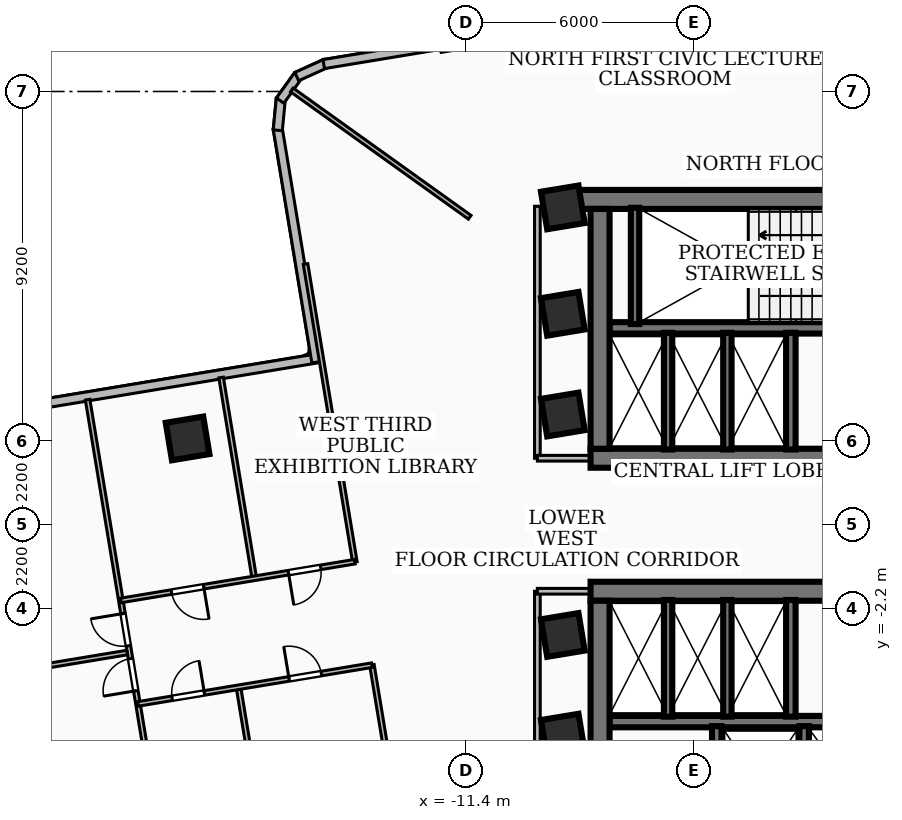
"""IFC4 building model, lengths in metres.
Left out: names, types, materials, properties, quantities, classifications, styles, units other than length and angle.
Written with IfcOpenShell. Run it as: python <this file> out.ifc"""

import sys

from ifc_helpers import new_model, si_unit, direction, frame, frame_2d, origin, origin_2d, place, context, subcontext, project, spatial, rectangle, extrude, element, fill, save


model = new_model("IFC4")
c1 = context("Model", 3, precision=1e-05, world=origin(), true_north=direction((0.0, 1.0)))
c2 = subcontext(c1, "Body", "Model", "MODEL_VIEW")
j1 = project(units=[si_unit("LENGTHUNIT", "METRE"), si_unit("PLANEANGLEUNIT", "RADIAN")], contexts=[c1])
p1 = place(None, origin())
s1 = spatial("IfcSite", under=j1, at=p1, CompositionType="ELEMENT")
p2 = place(p1, origin())
s2 = spatial("IfcBuilding", under=s1, at=p2, CompositionType="ELEMENT")
p3 = place(p2, frame((0.0, 0.0, 92.88)))
s3 = spatial("IfcBuildingStorey", under=s2, at=p3, CompositionType="ELEMENT", Elevation=92.88)
p4 = place(p3, frame((-8.78, 8.56, 0.0), z_axis=(0.0, 0.0, 1.0), x_axis=(1.0, 0.0, 0.0)))
e1 = element("IfcWall", 1, at=p4, inside=s3, PredefinedType="SHEAR", context=c2, shape_type="SweptSolid", body=[
    extrude(rectangle(XDim=17.56, YDim=0.5, at=frame_2d((8.78, 0.0))), origin(), (0.0, 0.0, 1.0), 3.34),
])
p5 = place(p3, frame((8.12, 1.75, 0.0), z_axis=(0.0, 0.0, 1.0), x_axis=(-1.0, 0.0, 0.0)))
e2 = element("IfcWall", 2, at=p5, inside=s3, PredefinedType="SHEAR", context=c2, shape_type="SweptSolid", body=[
    extrude(rectangle(XDim=16.24, YDim=0.5, at=frame_2d((8.12, 0.0))), origin(), (0.0, 0.0, 1.0), 3.34),
])
p6 = place(p5, frame((7.45, 0.0, 0.0)))
e3 = element("IfcOpeningElement", 3, at=p6, cuts=e2, PredefinedType="OPENING", context=c2, shape_type="SweptSolid", body=[
    extrude(rectangle(XDim=1.0, YDim=2.1, at=frame_2d((0.5, 1.05))), frame((0.0, 0.26, 0.0), z_axis=(0.0, -1.0, 0.0), x_axis=(1.0, 0.0, 0.0)), (0.0, 0.0, 1.0), 0.52),
])
p7 = place(p5, frame((3.85, 0.0, 0.0)))
e4 = element("IfcOpeningElement", 4, at=p7, cuts=e2, PredefinedType="OPENING", context=c2, shape_type="SweptSolid", body=[
    extrude(rectangle(XDim=0.9, YDim=2.06, at=frame_2d((0.45, 1.03))), frame((0.0, 0.26, 0.0), z_axis=(0.0, -1.0, 0.0), x_axis=(1.0, 0.0, 0.0)), (0.0, 0.0, 1.0), 0.52),
])
p8 = place(p5, frame((2.35, 0.0, 0.0)))
e5 = element("IfcOpeningElement", 5, at=p8, cuts=e2, PredefinedType="OPENING", context=c2, shape_type="SweptSolid", body=[
    extrude(rectangle(XDim=0.9, YDim=2.06, at=frame_2d((0.45, 1.03))), frame((0.0, 0.26, 0.0), z_axis=(0.0, -1.0, 0.0), x_axis=(1.0, 0.0, 0.0)), (0.0, 0.0, 1.0), 0.52),
])
p9 = place(p5, frame((0.8, 0.0, 0.0)))
e6 = element("IfcOpeningElement", 6, at=p9, cuts=e2, PredefinedType="OPENING", context=c2, shape_type="SweptSolid", body=[
    extrude(rectangle(XDim=0.9, YDim=2.06, at=frame_2d((0.45, 1.03))), frame((0.0, 0.26, 0.0), z_axis=(0.0, -1.0, 0.0), x_axis=(1.0, 0.0, 0.0)), (0.0, 0.0, 1.0), 0.52),
])
p10 = place(p3, frame((-7.87, 2.0, 0.0), z_axis=(0.0, 0.0, 1.0), x_axis=(0.0, 1.0, 0.0)))
e7 = element("IfcWall", 7, at=p10, inside=s3, PredefinedType="SHEAR", context=c2, shape_type="SweptSolid", body=[
    extrude(rectangle(XDim=6.31, YDim=0.5, at=frame_2d((3.155, 0.0))), origin(), (0.0, 0.0, 1.0), 3.34),
])
p11 = place(p3, frame((7.62, 5.18, 0.0), z_axis=(0.0, 0.0, 1.0), x_axis=(-1.0, 0.0, 0.0)))
e8 = element("IfcWall", 8, at=p11, inside=s3, PredefinedType="SOLIDWALL", context=c2, shape_type="SweptSolid", body=[
    extrude(rectangle(XDim=15.24, YDim=0.3, at=frame_2d((7.62, 0.0))), origin(), (0.0, 0.0, 1.0), 3.34),
])
p12 = place(p11, frame((5.77, 0.0, 0.0)))
e9 = element("IfcOpeningElement", 9, at=p12, cuts=e8, PredefinedType="OPENING", context=c2, shape_type="SweptSolid", body=[
    extrude(rectangle(XDim=1.1, YDim=2.15, at=frame_2d((0.55, 1.075))), frame((0.0, 0.16, 0.0), z_axis=(0.0, -1.0, 0.0), x_axis=(1.0, 0.0, 0.0)), (0.0, 0.0, 1.0), 0.32),
])
p13 = place(p11, frame((2.97, 0.0, 0.0)))
e10 = element("IfcOpeningElement", 10, at=p13, cuts=e8, PredefinedType="OPENING", context=c2, shape_type="SweptSolid", body=[
    extrude(rectangle(XDim=1.1, YDim=2.15, at=frame_2d((0.55, 1.075))), frame((0.0, 0.16, 0.0), z_axis=(0.0, -1.0, 0.0), x_axis=(1.0, 0.0, 0.0)), (0.0, 0.0, 1.0), 0.32),
])
p14 = place(p11, frame((7.97, 0.0, 0.0)))
e11 = element("IfcOpeningElement", 11, at=p14, cuts=e8, PredefinedType="OPENING", context=c2, shape_type="SweptSolid", body=[
    extrude(rectangle(XDim=1.0, YDim=2.1, at=frame_2d((0.5, 1.05))), frame((0.0, 0.16, 0.0), z_axis=(0.0, -1.0, 0.0), x_axis=(1.0, 0.0, 0.0)), (0.0, 0.0, 1.0), 0.32),
])
p15 = place(p3, frame((-8.12, -1.75, 0.0), z_axis=(0.0, 0.0, 1.0), x_axis=(1.0, 0.0, 0.0)))
e12 = element("IfcWall", 12, at=p15, inside=s3, PredefinedType="SHEAR", context=c2, shape_type="SweptSolid", body=[
    extrude(rectangle(XDim=16.24, YDim=0.5, at=frame_2d((8.12, 0.0))), origin(), (0.0, 0.0, 1.0), 3.34),
])
p16 = place(p15, frame((7.45, 0.0, 0.0)))
e13 = element("IfcOpeningElement", 13, at=p16, cuts=e12, PredefinedType="OPENING", context=c2, shape_type="SweptSolid", body=[
    extrude(rectangle(XDim=1.0, YDim=2.1, at=frame_2d((0.5, 1.05))), frame((0.0, 0.26, 0.0), z_axis=(0.0, -1.0, 0.0), x_axis=(1.0, 0.0, 0.0)), (0.0, 0.0, 1.0), 0.52),
])
p17 = place(p15, frame((10.965, 0.0, 0.0)))
e14 = element("IfcOpeningElement", 14, at=p17, cuts=e12, PredefinedType="OPENING", context=c2, shape_type="SweptSolid", body=[
    extrude(rectangle(XDim=1.05, YDim=2.15, at=frame_2d((0.525, 1.075))), frame((0.0, 0.26, 0.0), z_axis=(0.0, -1.0, 0.0), x_axis=(1.0, 0.0, 0.0)), (0.0, 0.0, 1.0), 0.52),
])
p18 = place(p15, frame((12.525, 0.0, 0.0)))
e15 = element("IfcOpeningElement", 15, at=p18, cuts=e12, PredefinedType="OPENING", context=c2, shape_type="SweptSolid", body=[
    extrude(rectangle(XDim=1.05, YDim=2.15, at=frame_2d((0.525, 1.075))), frame((0.0, 0.26, 0.0), z_axis=(0.0, -1.0, 0.0), x_axis=(1.0, 0.0, 0.0)), (0.0, 0.0, 1.0), 0.52),
])
p19 = place(p15, frame((14.085, 0.0, 0.0)))
e16 = element("IfcOpeningElement", 16, at=p19, cuts=e12, PredefinedType="OPENING", context=c2, shape_type="SweptSolid", body=[
    extrude(rectangle(XDim=1.05, YDim=2.15, at=frame_2d((0.525, 1.075))), frame((0.0, 0.26, 0.0), z_axis=(0.0, -1.0, 0.0), x_axis=(1.0, 0.0, 0.0)), (0.0, 0.0, 1.0), 0.52),
])
p20 = place(p3, frame((-7.87, -8.31, 0.0), z_axis=(0.0, 0.0, 1.0), x_axis=(0.0, 1.0, 0.0)))
e17 = element("IfcWall", 17, at=p20, inside=s3, PredefinedType="SHEAR", context=c2, shape_type="SweptSolid", body=[
    extrude(rectangle(XDim=6.31, YDim=0.5, at=frame_2d((3.155, 0.0))), origin(), (0.0, 0.0, 1.0), 3.34),
])
p21 = place(p3, frame((-7.62, -5.18, 0.0), z_axis=(0.0, 0.0, 1.0), x_axis=(1.0, 0.0, 0.0)))
e18 = element("IfcWall", 18, at=p21, inside=s3, PredefinedType="SOLIDWALL", context=c2, shape_type="SweptSolid", body=[
    extrude(rectangle(XDim=15.24, YDim=0.3, at=frame_2d((7.62, 0.0))), origin(), (0.0, 0.0, 1.0), 3.34),
])
p22 = place(p21, frame((5.77, 0.0, 0.0)))
e19 = element("IfcOpeningElement", 19, at=p22, cuts=e18, PredefinedType="OPENING", context=c2, shape_type="SweptSolid", body=[
    extrude(rectangle(XDim=1.1, YDim=2.15, at=frame_2d((0.55, 1.075))), frame((0.0, 0.16, 0.0), z_axis=(0.0, -1.0, 0.0), x_axis=(1.0, 0.0, 0.0)), (0.0, 0.0, 1.0), 0.32),
])
p23 = place(p21, frame((7.97, 0.0, 0.0)))
e20 = element("IfcOpeningElement", 20, at=p23, cuts=e18, PredefinedType="OPENING", context=c2, shape_type="SweptSolid", body=[
    extrude(rectangle(XDim=1.0, YDim=2.1, at=frame_2d((0.5, 1.05))), frame((0.0, 0.16, 0.0), z_axis=(0.0, -1.0, 0.0), x_axis=(1.0, 0.0, 0.0)), (0.0, 0.0, 1.0), 0.32),
])
p24 = place(p3, frame((-6.95, 5.28, 0.0), z_axis=(0.0, 0.0, 1.0), x_axis=(0.0, 1.0, 0.0)))
e21 = element("IfcWall", 21, at=p24, inside=s3, PredefinedType="SOLIDWALL", context=c2, shape_type="SweptSolid", body=[
    extrude(rectangle(XDim=3.06, YDim=0.22, at=frame_2d((1.53, 0.0))), origin(), (0.0, 0.0, 1.0), 3.34),
])
p25 = place(p3, frame((-2.85, 1.98, 0.0), z_axis=(0.0, 0.0, 1.0), x_axis=(0.0, 1.0, 0.0)))
e22 = element("IfcWall", 22, at=p25, inside=s3, PredefinedType="SOLIDWALL", context=c2, shape_type="SweptSolid", body=[
    extrude(rectangle(XDim=3.07, YDim=0.25, at=frame_2d((1.535, 0.0))), origin(), (0.0, 0.0, 1.0), 3.34),
])
for number, where, z_axis, x_axis in (
    (23, (-2.5, -8.34, 0.0), (0.0, 0.0, 1.0), (0.0, 1.0, 0.0)),
    (24, (-4.8, -8.34, 0.0), (0.0, 0.0, 1.0), (0.0, 1.0, 0.0)),
):
    element("IfcWall", number, at=place(p3, frame(where, z_axis=z_axis, x_axis=x_axis)), inside=s3, PredefinedType="SOLIDWALL", context=c2, shape_type="SweptSolid", body=[
        extrude(rectangle(XDim=3.04, YDim=0.25, at=frame_2d((1.52, 0.0))), origin(), (0.0, 0.0, 1.0), 3.34),
    ])
p26 = place(p3, frame((-2.85, -5.05, 0.0), z_axis=(0.0, 0.0, 1.0), x_axis=(0.0, 1.0, 0.0)))
e25 = element("IfcWall", 25, at=p26, inside=s3, PredefinedType="SOLIDWALL", context=c2, shape_type="SweptSolid", body=[
    extrude(rectangle(XDim=3.07, YDim=0.25, at=frame_2d((1.535, 0.0))), origin(), (0.0, 0.0, 1.0), 3.34),
])
for number, where, z_axis, x_axis in (
    (26, (-6.08, 1.98, 0.0), (0.0, 0.0, 1.0), (0.0, 1.0, 0.0)),
    (27, (-4.52, 1.98, 0.0), (0.0, 0.0, 1.0), (0.0, 1.0, 0.0)),
    (28, (-6.08, -5.05, 0.0), (0.0, 0.0, 1.0), (0.0, 1.0, 0.0)),
    (29, (-4.52, -5.05, 0.0), (0.0, 0.0, 1.0), (0.0, 1.0, 0.0)),
):
    element("IfcWall", number, at=place(p3, frame(where, z_axis=z_axis, x_axis=x_axis)), inside=s3, PredefinedType="SOLIDWALL", context=c2, shape_type="SweptSolid", body=[
        extrude(rectangle(XDim=3.07, YDim=0.22, at=frame_2d((1.535, 0.0))), origin(), (0.0, 0.0, 1.0), 3.34),
    ])
for number, where, z_axis, x_axis in (
    (30, (-8.85, -5.55, 0.0), (0.0, 0.0, 1.0), (0.987, 0.163, 0.0)),
    (31, (-8.85, -2.9, 0.0), (0.0, 0.0, 1.0), (0.987, 0.163, 0.0)),
    (32, (-8.85, 2.9, 0.0), (0.0, 0.0, 1.0), (0.987, 0.163, 0.0)),
    (33, (-8.85, 5.55, 0.0), (0.0, 0.0, 1.0), (0.987, 0.163, 0.0)),
    (34, (-8.85, 8.35, 0.0), (0.0, 0.0, 1.0), (0.987, 0.163, 0.0)),
    (35, (-18.724, 2.271, 0.0), (0.0, 0.0, 1.0), (0.987, 0.163, 0.0)),
):
    element("IfcColumn", number, at=place(p3, frame(where, z_axis=z_axis, x_axis=x_axis)), inside=s3, PredefinedType="COLUMN", context=c2, shape_type="SweptSolid", body=[
        extrude(rectangle(XDim=1.0, YDim=1.0, at=origin_2d()), origin(), (0.0, 0.0, 1.0), 3.6),
    ])
p27 = place(p3, frame((-31.312, 1.729, 0.0), z_axis=(0.0, 0.0, 1.0), x_axis=(0.986572947557, 0.163321214629, 0.0)))
e36 = element("IfcWall", 36, at=p27, inside=s3, PredefinedType="SOLIDWALL", context=c2, shape_type="SweptSolid", body=[
    extrude(rectangle(XDim=16.274, YDim=0.24, at=frame_2d((8.137, 0.0))), origin(), (0.0, 0.0, 1.0), 3.34),
])
p28 = place(p27, frame((1.1, 0.0, 0.85)))
e37 = element("IfcOpeningElement", 37, at=p28, cuts=e36, PredefinedType="OPENING", context=c2, shape_type="SweptSolid", body=[
    extrude(rectangle(XDim=2.4, YDim=1.85, at=frame_2d((1.2, 0.925))), frame((0.0, 0.13, 0.0), z_axis=(0.0, -1.0, 0.0), x_axis=(1.0, 0.0, 0.0)), (0.0, 0.0, 1.0), 0.26),
])
p29 = place(p3, frame((-15.335, 4.276, 0.0), z_axis=(0.0, 0.0, 1.0), x_axis=(-0.16323720082, 0.986586851863, 0.0)))
e38 = element("IfcWall", 38, at=p29, inside=s3, PredefinedType="SOLIDWALL", context=c2, shape_type="SweptSolid", body=[
    extrude(rectangle(XDim=6.237, YDim=0.24, at=frame_2d((3.118, 0.0))), origin(), (0.0, 0.0, 1.0), 3.34),
])
p30 = place(p3, frame((-16.351, 10.379, 0.0), z_axis=(0.0, 0.0, 1.0), x_axis=(0.096474594184, 0.995335447313, 0.0)))
e39 = element("IfcWall", 39, at=p30, inside=s3, PredefinedType="SOLIDWALL", context=c2, shape_type="SweptSolid", body=[
    extrude(rectangle(XDim=0.83, YDim=0.24, at=frame_2d((0.415, 0.0))), origin(), (0.0, 0.0, 1.0), 3.34),
])
p31 = place(p3, frame((-16.288, 11.16, 0.0), z_axis=(0.0, 0.0, 1.0), x_axis=(0.583561896965, 0.812068662375, 0.0)))
e40 = element("IfcWall", 40, at=p31, inside=s3, PredefinedType="SOLIDWALL", context=c2, shape_type="SweptSolid", body=[
    extrude(rectangle(XDim=0.814, YDim=0.24, at=frame_2d((0.407, 0.0))), origin(), (0.0, 0.0, 1.0), 3.34),
])
p32 = place(p3, frame((-15.851, 11.791, 0.0), z_axis=(0.0, 0.0, 1.0), x_axis=(0.910868773958, 0.412696106872, 0.0)))
e41 = element("IfcWall", 41, at=p32, inside=s3, PredefinedType="SOLIDWALL", context=c2, shape_type="SweptSolid", body=[
    extrude(rectangle(XDim=0.831, YDim=0.24, at=frame_2d((0.416, 0.0))), origin(), (0.0, 0.0, 1.0), 3.34),
])
p33 = place(p3, frame((-15.142, 12.12, 0.0), z_axis=(0.0, 0.0, 1.0), x_axis=(0.986586085056, 0.163241835244, 0.0)))
e42 = element("IfcWall", 42, at=p33, inside=s3, PredefinedType="SOLIDWALL", context=c2, shape_type="SweptSolid", body=[
    extrude(rectangle(XDim=6.775, YDim=0.24, at=frame_2d((3.387, 0.0))), origin(), (0.0, 0.0, 1.0), 3.34),
])
p34 = place(p3, frame((-9.52, 1.75, 0.0), z_axis=(0.0, 0.0, 1.0), x_axis=(0.0, 1.0, 0.0)))
e43 = element("IfcWall", 43, at=p34, inside=s3, PredefinedType="PARTITIONING", context=c2, shape_type="SweptSolid", body=[
    extrude(rectangle(XDim=6.63, YDim=0.15, at=frame_2d((3.315, 0.0))), origin(), (0.0, 0.0, 1.0), 2.486),
])
p35 = place(p3, frame((-7.85, 1.75, 0.0), z_axis=(0.0, 0.0, 1.0), x_axis=(-1.0, 0.0, 0.0)))
e44 = element("IfcWall", 44, at=p35, inside=s3, PredefinedType="PARTITIONING", context=c2, shape_type="SweptSolid", body=[
    extrude(rectangle(XDim=1.67, YDim=0.15, at=frame_2d((0.835, 0.0))), origin(), (0.0, 0.0, 1.0), 2.405),
])
p36 = place(p3, frame((-9.52, -8.38, 0.0), z_axis=(0.0, 0.0, 1.0), x_axis=(0.0, 1.0, 0.0)))
e45 = element("IfcWall", 45, at=p36, inside=s3, PredefinedType="PARTITIONING", context=c2, shape_type="SweptSolid", body=[
    extrude(rectangle(XDim=6.63, YDim=0.15, at=frame_2d((3.315, 0.0))), origin(), (0.0, 0.0, 1.0), 2.486),
])
p37 = place(p3, frame((-7.85, -1.75, 0.0), z_axis=(0.0, 0.0, 1.0), x_axis=(-1.0, 0.0, 0.0)))
e46 = element("IfcWall", 46, at=p37, inside=s3, PredefinedType="PARTITIONING", context=c2, shape_type="SweptSolid", body=[
    extrude(rectangle(XDim=1.67, YDim=0.15, at=frame_2d((0.835, 0.0))), origin(), (0.0, 0.0, 1.0), 2.405),
])
p38 = place(p3, frame((-11.3, 8.09, 0.0), z_axis=(0.0, 0.0, 1.0), x_axis=(-0.813131268368, 0.582080355623, 0.0)))
e47 = element("IfcWall", 47, at=p38, inside=s3, PredefinedType="PARTITIONING", context=c2, shape_type="SweptSolid", body=[
    extrude(rectangle(XDim=5.757, YDim=0.12, at=frame_2d((2.878, 0.0))), origin(), (0.0, 0.0, 1.0), 3.34),
])
p39 = place(p3, frame((-13.874, -3.686, 0.0), z_axis=(0.0, 0.0, 1.0), x_axis=(0.163270245909, -0.98658138377, 0.0)))
e48 = element("IfcWall", 48, at=p39, inside=s3, PredefinedType="PARTITIONING", context=c2, shape_type="SweptSolid", body=[
    extrude(rectangle(XDim=8.489, YDim=0.12, at=frame_2d((4.245, 0.0))), origin(), (0.0, 0.0, 1.0), 2.486),
])
p40 = place(p3, frame((-15.62, 6.86, 0.0), z_axis=(0.0, 0.0, 1.0), x_axis=(0.16330811288, -0.986575116384, 0.0)))
e49 = element("IfcWall", 49, at=p40, inside=s3, PredefinedType="PARTITIONING", context=c2, shape_type="SweptSolid", body=[
    extrude(rectangle(XDim=7.949, YDim=0.12, at=frame_2d((3.974, 0.0))), origin(), (0.0, 0.0, 1.0), 2.486),
])
p41 = place(p3, frame((-17.382, -4.297, 0.0), z_axis=(0.0, 0.0, 1.0), x_axis=(0.163556674632, -0.986533939702, 0.0)))
e50 = element("IfcWall", 50, at=p41, inside=s3, PredefinedType="PARTITIONING", context=c2, shape_type="SweptSolid", body=[
    extrude(rectangle(XDim=4.794, YDim=0.12, at=frame_2d((2.397, 0.0))), origin(), (0.0, 0.0, 1.0), 2.486),
])
p42 = place(p3, frame((-17.842, 3.873, 0.0), z_axis=(0.0, 0.0, 1.0), x_axis=(0.16329307855, -0.986577604904, 0.0)))
e51 = element("IfcWall", 51, at=p42, inside=s3, PredefinedType="PARTITIONING", context=c2, shape_type="SweptSolid", body=[
    extrude(rectangle(XDim=5.334, YDim=0.12, at=frame_2d((2.667, 0.0))), origin(), (0.0, 0.0, 1.0), 2.486),
])
p43 = place(p3, frame((-20.029, -4.715, 0.0), z_axis=(0.0, 0.0, 1.0), x_axis=(0.986548927366, 0.163466247017, 0.0)))
e52 = element("IfcWall", 52, at=p43, inside=s3, PredefinedType="PARTITIONING", context=c2, shape_type="SweptSolid", body=[
    extrude(rectangle(XDim=6.24, YDim=0.12, at=frame_2d((3.12, 0.0))), origin(), (0.0, 0.0, 1.0), 3.34),
])
p44 = place(p43, frame((4.03, 0.0, 0.0)))
e53 = element("IfcOpeningElement", 53, at=p44, cuts=e52, PredefinedType="OPENING", context=c2, shape_type="SweptSolid", body=[
    extrude(rectangle(XDim=0.86, YDim=2.04, at=frame_2d((0.43, 1.02))), frame((0.0, 0.07, 0.0), z_axis=(0.0, -1.0, 0.0), x_axis=(1.0, 0.0, 0.0)), (0.0, 0.0, 1.0), 0.14),
])
p45 = place(p43, frame((0.91, 0.0, 0.0)))
e54 = element("IfcOpeningElement", 54, at=p45, cuts=e52, PredefinedType="OPENING", context=c2, shape_type="SweptSolid", body=[
    extrude(rectangle(XDim=0.86, YDim=2.04, at=frame_2d((0.43, 1.02))), frame((0.0, 0.07, 0.0), z_axis=(0.0, -1.0, 0.0), x_axis=(1.0, 0.0, 0.0)), (0.0, 0.0, 1.0), 0.14),
])
p46 = place(p3, frame((-14.324, -0.972, 0.0), z_axis=(0.0, 0.0, 1.0), x_axis=(-0.986548927366, -0.163466247017, 0.0)))
e55 = element("IfcWall", 55, at=p46, inside=s3, PredefinedType="PARTITIONING", context=c2, shape_type="SweptSolid", body=[
    extrude(rectangle(XDim=6.24, YDim=0.12, at=frame_2d((3.12, 0.0))), origin(), (0.0, 0.0, 1.0), 3.34),
])
p47 = place(p46, frame((0.91, 0.0, 0.0)))
e56 = element("IfcOpeningElement", 56, at=p47, cuts=e55, PredefinedType="OPENING", context=c2, shape_type="SweptSolid", body=[
    extrude(rectangle(XDim=0.86, YDim=2.04, at=frame_2d((0.43, 1.02))), frame((0.0, 0.07, 0.0), z_axis=(0.0, -1.0, 0.0), x_axis=(1.0, 0.0, 0.0)), (0.0, 0.0, 1.0), 0.14),
])
p48 = place(p46, frame((4.03, 0.0, 0.0)))
e57 = element("IfcOpeningElement", 57, at=p48, cuts=e55, PredefinedType="OPENING", context=c2, shape_type="SweptSolid", body=[
    extrude(rectangle(XDim=0.86, YDim=2.04, at=frame_2d((0.43, 1.02))), frame((0.0, 0.07, 0.0), z_axis=(0.0, -1.0, 0.0), x_axis=(1.0, 0.0, 0.0)), (0.0, 0.0, 1.0), 0.14),
])
p49 = place(p3, frame((-20.314, -3.363, 0.0), z_axis=(0.0, 0.0, 1.0), x_axis=(-0.986565802435, -0.163364370245, 0.0)))
e58 = element("IfcWall", 58, at=p49, inside=s3, PredefinedType="PARTITIONING", context=c2, shape_type="SweptSolid", body=[
    extrude(rectangle(XDim=11.404, YDim=0.12, at=frame_2d((5.702, 0.0))), origin(), (0.0, 0.0, 1.0), 2.832),
])
p50 = place(p3, frame((-19.243, -9.465, 0.0), z_axis=(0.0, 0.0, 1.0), x_axis=(-0.163348643691, 0.98656840645, 0.0)))
e59 = element("IfcWall", 59, at=p50, inside=s3, PredefinedType="PARTITIONING", context=c2, shape_type="SweptSolid", body=[
    extrude(rectangle(XDim=12.93, YDim=0.12, at=frame_2d((6.465, 0.0))), origin(), (0.0, 0.0, 1.0), 2.486),
])
p51 = place(p50, frame((6.365, 0.0, 0.0)))
e60 = element("IfcOpeningElement", 60, at=p51, cuts=e59, PredefinedType="OPENING", context=c2, shape_type="SweptSolid", body=[
    extrude(rectangle(XDim=0.86, YDim=2.04, at=frame_2d((0.43, 1.02))), frame((0.0, 0.07, 0.0), z_axis=(0.0, -1.0, 0.0), x_axis=(1.0, 0.0, 0.0)), (0.0, 0.0, 1.0), 0.14),
])
p52 = place(p50, frame((5.165, 0.0, 0.0)))
e61 = element("IfcOpeningElement", 61, at=p52, cuts=e59, PredefinedType="OPENING", context=c2, shape_type="SweptSolid", body=[
    extrude(rectangle(XDim=0.86, YDim=2.04, at=frame_2d((0.43, 1.02))), frame((0.0, 0.07, 0.0), z_axis=(0.0, -1.0, 0.0), x_axis=(1.0, 0.0, 0.0)), (0.0, 0.0, 1.0), 0.14),
])
p53 = place(p44, origin())
e62 = element("IfcDoor", 62, at=p53, inside=s3, OperationType="SINGLE_SWING_LEFT", PredefinedType="DOOR", context=c2, shape_type="SweptSolid", body=[
    extrude(rectangle(XDim=0.86, YDim=2.04, at=frame_2d((0.43, 1.02))), frame((0.0, 0.025, 0.0), z_axis=(0.0, -1.0, 0.0), x_axis=(1.0, 0.0, 0.0)), (0.0, 0.0, 1.0), 0.05),
])
fill(e53, e62)
p54 = place(p45, origin())
e63 = element("IfcDoor", 63, at=p54, inside=s3, OperationType="SINGLE_SWING_RIGHT", PredefinedType="DOOR", context=c2, shape_type="SweptSolid", body=[
    extrude(rectangle(XDim=0.86, YDim=2.04, at=frame_2d((0.43, 1.02))), frame((0.0, 0.025, 0.0), z_axis=(0.0, -1.0, 0.0), x_axis=(1.0, 0.0, 0.0)), (0.0, 0.0, 1.0), 0.05),
])
fill(e54, e63)
p55 = place(p47, origin())
e64 = element("IfcDoor", 64, at=p55, inside=s3, OperationType="SINGLE_SWING_RIGHT", PredefinedType="DOOR", context=c2, shape_type="SweptSolid", body=[
    extrude(rectangle(XDim=0.86, YDim=2.04, at=frame_2d((0.43, 1.02))), frame((0.0, 0.025, 0.0), z_axis=(0.0, -1.0, 0.0), x_axis=(1.0, 0.0, 0.0)), (0.0, 0.0, 1.0), 0.05),
])
fill(e56, e64)
p56 = place(p48, origin())
e65 = element("IfcDoor", 65, at=p56, inside=s3, OperationType="SINGLE_SWING_LEFT", PredefinedType="DOOR", context=c2, shape_type="SweptSolid", body=[
    extrude(rectangle(XDim=0.86, YDim=2.04, at=frame_2d((0.43, 1.02))), frame((0.0, 0.025, 0.0), z_axis=(0.0, -1.0, 0.0), x_axis=(1.0, 0.0, 0.0)), (0.0, 0.0, 1.0), 0.05),
])
fill(e57, e65)
p57 = place(p51, origin())
e66 = element("IfcDoor", 66, at=p57, inside=s3, OperationType="SINGLE_SWING_RIGHT", PredefinedType="DOOR", context=c2, shape_type="SweptSolid", body=[
    extrude(rectangle(XDim=0.86, YDim=2.04, at=frame_2d((0.43, 1.02))), frame((0.0, 0.025, 0.0), z_axis=(0.0, -1.0, 0.0), x_axis=(1.0, 0.0, 0.0)), (0.0, 0.0, 1.0), 0.05),
])
fill(e60, e66)
p58 = place(p52, origin())
e67 = element("IfcDoor", 67, at=p58, inside=s3, OperationType="SINGLE_SWING_LEFT", PredefinedType="DOOR", context=c2, shape_type="SweptSolid", body=[
    extrude(rectangle(XDim=0.86, YDim=2.04, at=frame_2d((0.43, 1.02))), frame((0.0, 0.025, 0.0), z_axis=(0.0, -1.0, 0.0), x_axis=(1.0, 0.0, 0.0)), (0.0, 0.0, 1.0), 0.05),
])
fill(e61, e67)
save(model, sys.argv[1])
